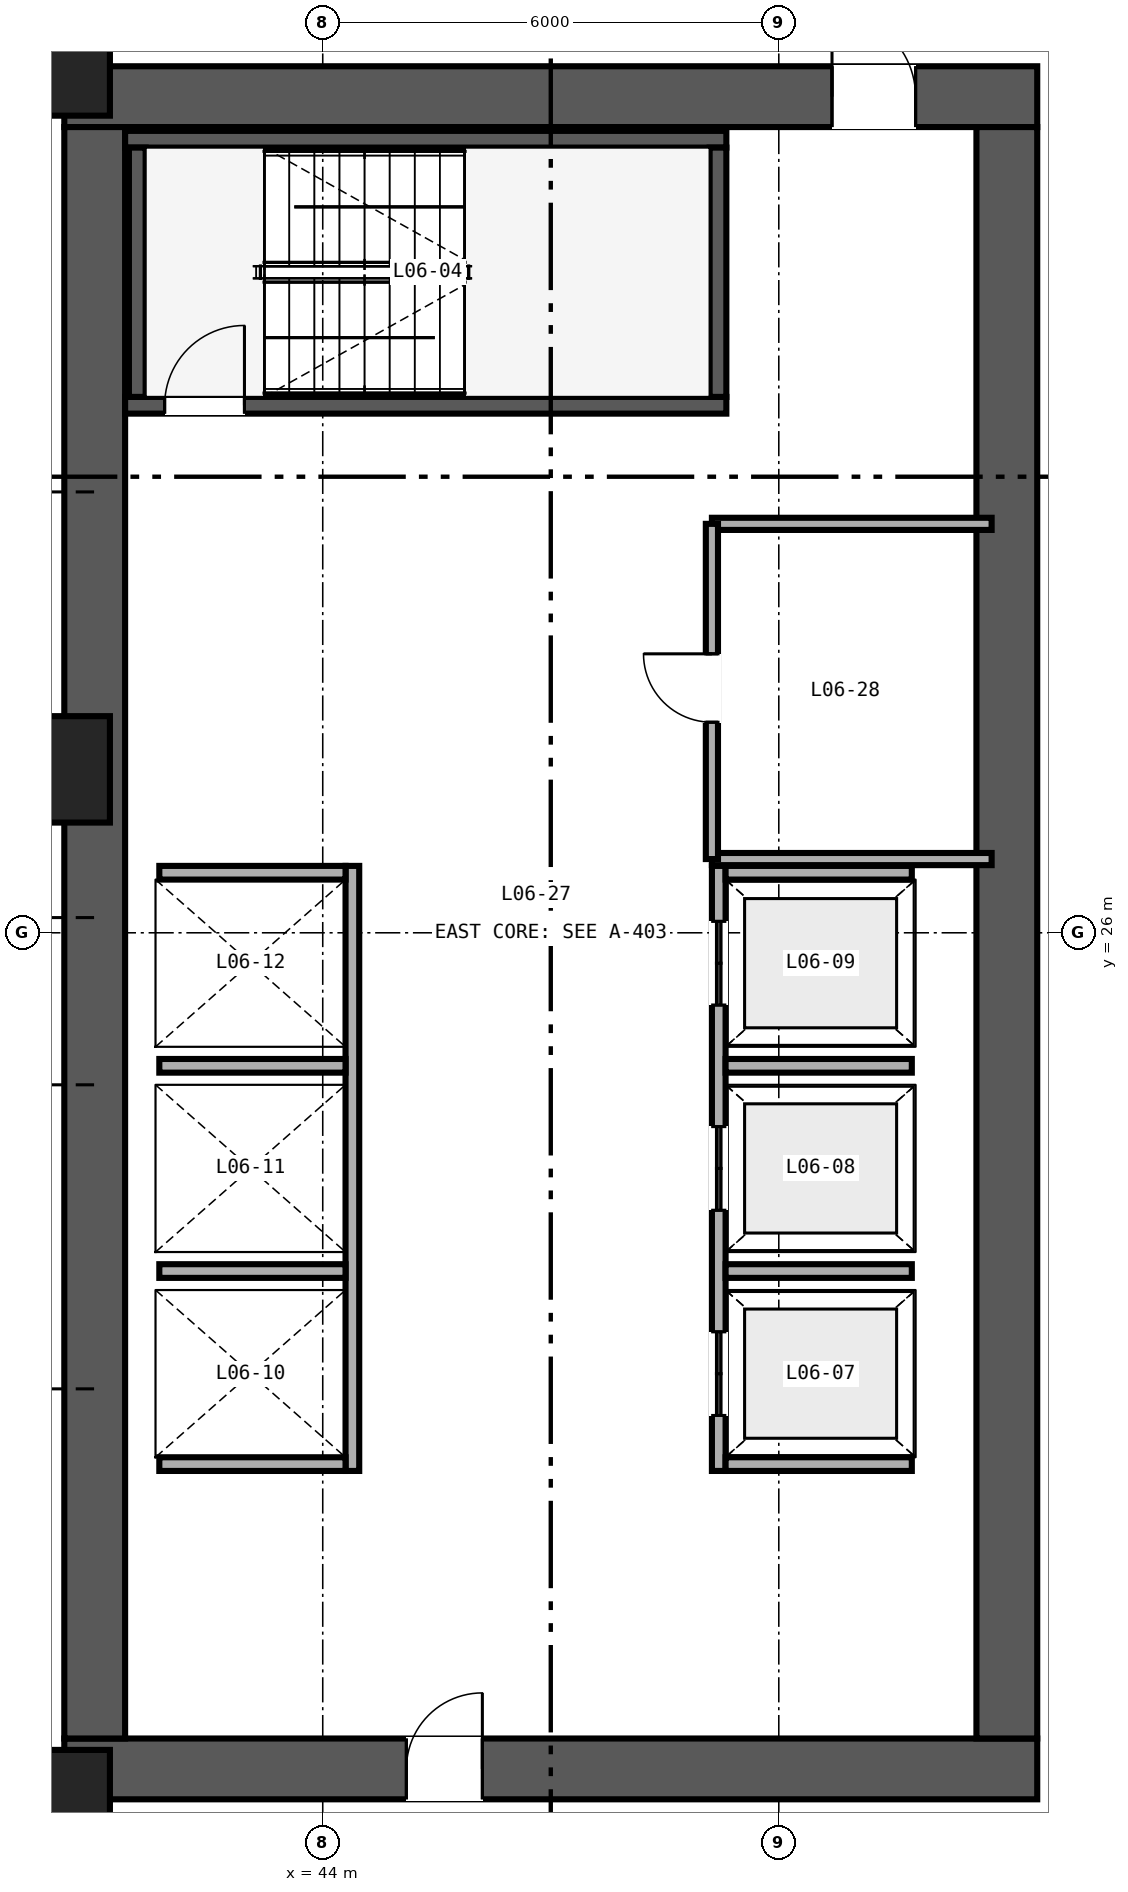
"""IFC4 building model, lengths in metres.
Left out: names, types, materials, properties, quantities, classifications, styles, units other than length and angle.
Written with IfcOpenShell. Run it as: python <this file> out.ifc"""

import sys

from ifc_helpers import new_model, si_unit, direction, frame, frame_2d, origin, origin_2d, place, context, subcontext, project, spatial, rectangle, extrude, source, transform, mapped, element, fill, save


model = new_model("IFC4")
c1 = context("Model", 3, precision=1e-05, world=origin(), true_north=direction((0.0, 1.0)))
c2 = subcontext(c1, "Body", "Model", "MODEL_VIEW")
j1 = project(units=[si_unit("LENGTHUNIT", "METRE"), si_unit("PLANEANGLEUNIT", "RADIAN")], contexts=[c1])
p1 = place(None, origin())
s1 = spatial("IfcSite", under=j1, at=p1, CompositionType="ELEMENT")
p2 = place(p1, origin())
s2 = spatial("IfcBuilding", under=s1, at=p2, CompositionType="ELEMENT")
p3 = place(p2, frame((0.0, 0.0, 28.8)))
s3 = spatial("IfcBuildingStorey", under=s2, at=p3, CompositionType="ELEMENT", Elevation=28.8)
p4 = place(p3, frame((40.6, 15.0, 0.0), z_axis=(0.0, 0.0, 1.0), x_axis=(1.0, 0.0, 0.0)))
e1 = element("IfcWall", 1, at=p4, inside=s3, PredefinedType="SHEAR", context=c2, shape_type="SweptSolid", body=[
    extrude(rectangle(XDim=12.8, YDim=0.8, at=frame_2d((6.4, 0.0))), origin(), (0.0, 0.0, 1.0), 5.75),
])
p5 = place(p4, frame((4.5, 0.0, 0.0)))
e2 = element("IfcOpeningElement", 2, at=p5, cuts=e1, PredefinedType="OPENING", context=c2, shape_type="SweptSolid", body=[
    extrude(rectangle(XDim=1.0, YDim=2.15, at=frame_2d((0.5, 1.075))), frame((0.0, 0.41, 0.0), z_axis=(0.0, -1.0, 0.0), x_axis=(1.0, 0.0, 0.0)), (0.0, 0.0, 1.0), 0.82),
])
p6 = place(p3, frame((40.6, 37.0, 0.0), z_axis=(0.0, 0.0, 1.0), x_axis=(1.0, 0.0, 0.0)))
e3 = element("IfcWall", 3, at=p6, inside=s3, PredefinedType="SHEAR", context=c2, shape_type="SweptSolid", body=[
    extrude(rectangle(XDim=12.8, YDim=0.8, at=frame_2d((6.4, 0.0))), origin(), (0.0, 0.0, 1.0), 5.75),
])
p7 = place(p6, frame((10.1, 0.0, 0.0)))
e4 = element("IfcOpeningElement", 4, at=p7, cuts=e3, PredefinedType="OPENING", context=c2, shape_type="SweptSolid", body=[
    extrude(rectangle(XDim=1.1, YDim=2.15, at=frame_2d((0.55, 1.075))), frame((0.0, 0.41, 0.0), z_axis=(0.0, -1.0, 0.0), x_axis=(1.0, 0.0, 0.0)), (0.0, 0.0, 1.0), 0.82),
])
for number, where, z_axis, x_axis in (
    (5, (41.0, 15.4, 0.0), (0.0, 0.0, 1.0), (0.0, 1.0, 0.0)),
    (6, (53.0, 15.4, 0.0), (0.0, 0.0, 1.0), (0.0, 1.0, 0.0)),
):
    element("IfcWall", number, at=place(p3, frame(where, z_axis=z_axis, x_axis=x_axis)), inside=s3, PredefinedType="SHEAR", context=c2, shape_type="SweptSolid", body=[
        extrude(rectangle(XDim=21.2, YDim=0.8, at=frame_2d((10.6, 0.0))), origin(), (0.0, 0.0, 1.0), 5.75),
    ])
p8 = place(p3, frame((41.4, 32.94, 0.0), z_axis=(0.0, 0.0, 1.0), x_axis=(1.0, 0.0, 0.0)))
e7 = element("IfcWall", 7, at=p8, inside=s3, PredefinedType="SHEAR", context=c2, shape_type="SweptSolid", body=[
    extrude(rectangle(XDim=7.91, YDim=0.22, at=frame_2d((3.955, 0.0))), origin(), (0.0, 0.0, 1.0), 5.8),
])
p9 = place(p8, frame((0.52, 0.0, 0.0)))
e8 = element("IfcOpeningElement", 8, at=p9, cuts=e7, PredefinedType="OPENING", context=c2, shape_type="SweptSolid", body=[
    extrude(rectangle(XDim=1.05, YDim=2.15, at=frame_2d((0.525, 1.075))), frame((0.0, 0.12, 0.0), z_axis=(0.0, -1.0, 0.0), x_axis=(1.0, 0.0, 0.0)), (0.0, 0.0, 1.0), 0.24),
])
p10 = place(p3, frame((41.4, 36.44, 0.0), z_axis=(0.0, 0.0, 1.0), x_axis=(1.0, 0.0, 0.0)))
e9 = element("IfcWall", 9, at=p10, inside=s3, PredefinedType="SHEAR", context=c2, shape_type="SweptSolid", body=[
    extrude(rectangle(XDim=7.91, YDim=0.22, at=frame_2d((3.955, 0.0))), origin(), (0.0, 0.0, 1.0), 5.8),
])
for number, where, z_axis, x_axis in (
    (10, (41.56, 33.05, 0.0), (0.0, 0.0, 1.0), (0.0, 1.0, 0.0)),
    (11, (49.2, 33.05, 0.0), (0.0, 0.0, 1.0), (0.0, 1.0, 0.0)),
):
    element("IfcWall", number, at=place(p3, frame(where, z_axis=z_axis, x_axis=x_axis)), inside=s3, PredefinedType="SHEAR", context=c2, shape_type="SweptSolid", body=[
        extrude(rectangle(XDim=3.28, YDim=0.22, at=frame_2d((1.64, 0.0))), origin(), (0.0, 0.0, 1.0), 5.8),
    ])
m1 = source(origin(), c2, "Body", "SweptSolid", [
    extrude(rectangle(XDim=1.4, YDim=1.4, at=origin_2d()), origin(), (0.0, 0.0, 1.0), 5.75),
])
for number, where, z_axis, x_axis in (
    (12, (40.5, 14.55, 0.0), (0.0, 0.0, 1.0), (1.0, 0.0, 0.0)),
    (13, (40.5, 28.15, 0.0), (0.0, 0.0, 1.0), (1.0, 0.0, 0.0)),
    (14, (40.5, 37.45, 0.0), (0.0, 0.0, 1.0), (1.0, 0.0, 0.0)),
):
    element("IfcColumn", number, at=place(p3, frame(where, z_axis=z_axis, x_axis=x_axis)), inside=s3, PredefinedType="COLUMN", context=c2, shape_type="MappedRepresentation", body=[
        mapped(m1, transform((0.0, 0.0, 0.0), scale=1.0)),
    ])
p11 = place(p3, frame((49.21, 18.92, 0.0), z_axis=(0.0, 0.0, 1.0), x_axis=(0.0, 1.0, 0.0)))
e15 = element("IfcWall", 15, at=p11, inside=s3, PredefinedType="SOLIDWALL", context=c2, shape_type="SweptSolid", body=[
    extrude(rectangle(XDim=7.96, YDim=0.18, at=frame_2d((3.98, 0.0))), origin(), (0.0, 0.0, 1.0), 5.75),
])
p12 = place(p11, frame((0.73, 0.0, 0.0)))
e16 = element("IfcOpeningElement", 16, at=p12, cuts=e15, PredefinedType="OPENING", context=c2, shape_type="SweptSolid", body=[
    extrude(rectangle(XDim=1.1, YDim=2.2, at=frame_2d((0.55, 1.1))), frame((0.0, 0.1, 0.0), z_axis=(0.0, -1.0, 0.0), x_axis=(1.0, 0.0, 0.0)), (0.0, 0.0, 1.0), 0.2),
])
p13 = place(p11, frame((3.43, 0.0, 0.0)))
e17 = element("IfcOpeningElement", 17, at=p13, cuts=e15, PredefinedType="OPENING", context=c2, shape_type="SweptSolid", body=[
    extrude(rectangle(XDim=1.1, YDim=2.2, at=frame_2d((0.55, 1.1))), frame((0.0, 0.1, 0.0), z_axis=(0.0, -1.0, 0.0), x_axis=(1.0, 0.0, 0.0)), (0.0, 0.0, 1.0), 0.2),
])
p14 = place(p11, frame((6.13, 0.0, 0.0)))
e18 = element("IfcOpeningElement", 18, at=p14, cuts=e15, PredefinedType="OPENING", context=c2, shape_type="SweptSolid", body=[
    extrude(rectangle(XDim=1.1, YDim=2.2, at=frame_2d((0.55, 1.1))), frame((0.0, 0.1, 0.0), z_axis=(0.0, -1.0, 0.0), x_axis=(1.0, 0.0, 0.0)), (0.0, 0.0, 1.0), 0.2),
])
for number, where, z_axis, x_axis in (
    (19, (49.3, 19.01, 0.0), (0.0, 0.0, 1.0), (1.0, 0.0, 0.0)),
    (20, (49.3, 26.79, 0.0), (0.0, 0.0, 1.0), (1.0, 0.0, 0.0)),
    (21, (49.3, 21.55, 0.0), (0.0, 0.0, 1.0), (1.0, 0.0, 0.0)),
    (22, (49.3, 24.25, 0.0), (0.0, 0.0, 1.0), (1.0, 0.0, 0.0)),
):
    element("IfcWall", number, at=place(p3, frame(where, z_axis=z_axis, x_axis=x_axis)), inside=s3, PredefinedType="SOLIDWALL", context=c2, shape_type="SweptSolid", body=[
        extrude(rectangle(XDim=2.45, YDim=0.18, at=frame_2d((1.225, 0.0))), origin(), (0.0, 0.0, 1.0), 5.75),
    ])
p15 = place(p3, frame((44.39, 18.92, 0.0), z_axis=(0.0, 0.0, 1.0), x_axis=(0.0, 1.0, 0.0)))
e23 = element("IfcWall", 23, at=p15, inside=s3, PredefinedType="SOLIDWALL", context=c2, shape_type="SweptSolid", body=[
    extrude(rectangle(XDim=7.96, YDim=0.18, at=frame_2d((3.98, 0.0))), origin(), (0.0, 0.0, 1.0), 5.75),
])
for number, where, z_axis, x_axis in (
    (24, (41.85, 19.01, 0.0), (0.0, 0.0, 1.0), (1.0, 0.0, 0.0)),
    (25, (41.85, 26.79, 0.0), (0.0, 0.0, 1.0), (1.0, 0.0, 0.0)),
    (26, (41.85, 21.55, 0.0), (0.0, 0.0, 1.0), (1.0, 0.0, 0.0)),
    (27, (41.85, 24.25, 0.0), (0.0, 0.0, 1.0), (1.0, 0.0, 0.0)),
):
    element("IfcWall", number, at=place(p3, frame(where, z_axis=z_axis, x_axis=x_axis)), inside=s3, PredefinedType="SOLIDWALL", context=c2, shape_type="SweptSolid", body=[
        extrude(rectangle(XDim=2.45, YDim=0.18, at=frame_2d((1.225, 0.0))), origin(), (0.0, 0.0, 1.0), 5.75),
    ])
p16 = place(p3, frame((49.12, 26.97, 0.0), z_axis=(0.0, 0.0, 1.0), x_axis=(1.0, 0.0, 0.0)))
e28 = element("IfcWall", 28, at=p16, inside=s3, PredefinedType="PARTITIONING", context=c2, shape_type="SweptSolid", body=[
    extrude(rectangle(XDim=3.68, YDim=0.16, at=frame_2d((1.84, 0.0))), origin(), (0.0, 0.0, 1.0), 5.75),
])
p17 = place(p3, frame((49.12, 31.38, 0.0), z_axis=(0.0, 0.0, 1.0), x_axis=(1.0, 0.0, 0.0)))
e29 = element("IfcWall", 29, at=p17, inside=s3, PredefinedType="PARTITIONING", context=c2, shape_type="SweptSolid", body=[
    extrude(rectangle(XDim=3.68, YDim=0.16, at=frame_2d((1.84, 0.0))), origin(), (0.0, 0.0, 1.0), 4.65),
])
p18 = place(p3, frame((49.12, 26.97, 0.0), z_axis=(0.0, 0.0, 1.0), x_axis=(0.0, 1.0, 0.0)))
e30 = element("IfcWall", 30, at=p18, inside=s3, PredefinedType="PARTITIONING", context=c2, shape_type="SweptSolid", body=[
    extrude(rectangle(XDim=4.41, YDim=0.16, at=frame_2d((2.205, 0.0))), origin(), (0.0, 0.0, 1.0), 4.65),
])
p19 = place(p18, frame((1.8, 0.0, 0.0)))
e31 = element("IfcOpeningElement", 31, at=p19, cuts=e30, PredefinedType="OPENING", context=c2, shape_type="SweptSolid", body=[
    extrude(rectangle(XDim=0.9, YDim=2.15, at=frame_2d((0.45, 1.075))), frame((0.0, 0.09, 0.0), z_axis=(0.0, -1.0, 0.0), x_axis=(1.0, 0.0, 0.0)), (0.0, 0.0, 1.0), 0.18),
])
m2 = source(origin(), c2, "Body", "SweptSolid", [
    extrude(rectangle(XDim=1.05, YDim=2.15, at=frame_2d((0.525, 1.075))), frame((0.0, 0.025, 0.0), z_axis=(0.0, -1.0, 0.0), x_axis=(1.0, 0.0, 0.0)), (0.0, 0.0, 1.0), 0.05),
])
p20 = place(p9, origin())
e32 = element("IfcDoor", 32, at=p20, inside=s3, OperationType="SINGLE_SWING_RIGHT", PredefinedType="DOOR", context=c2, shape_type="MappedRepresentation", body=[
    mapped(m2, transform((0.0, 0.0, 0.0), scale=1.0)),
])
fill(e8, e32)
m3 = source(origin(), c2, "Body", "SweptSolid", [
    extrude(rectangle(XDim=1.1, YDim=2.2, at=frame_2d((0.55, 1.1))), frame((0.0, 0.025, 0.0), z_axis=(0.0, -1.0, 0.0), x_axis=(1.0, 0.0, 0.0)), (0.0, 0.0, 1.0), 0.05),
])
p21 = place(p12, origin())
e33 = element("IfcDoor", 33, at=p21, inside=s3, OperationType="DOUBLE_DOOR_SLIDING", PredefinedType="DOOR", context=c2, shape_type="MappedRepresentation", body=[
    mapped(m3, transform((0.0, 0.0, 0.0), scale=1.0)),
])
fill(e16, e33)
p22 = place(p13, origin())
e34 = element("IfcDoor", 34, at=p22, inside=s3, OperationType="DOUBLE_DOOR_SLIDING", PredefinedType="DOOR", context=c2, shape_type="MappedRepresentation", body=[
    mapped(m3, transform((0.0, 0.0, 0.0), scale=1.0)),
])
fill(e17, e34)
p23 = place(p14, origin())
e35 = element("IfcDoor", 35, at=p23, inside=s3, OperationType="DOUBLE_DOOR_SLIDING", PredefinedType="DOOR", context=c2, shape_type="MappedRepresentation", body=[
    mapped(m3, transform((0.0, 0.0, 0.0), scale=1.0)),
])
fill(e18, e35)
m4 = source(origin(), c2, "Body", "SweptSolid", [
    extrude(rectangle(XDim=1.0, YDim=2.15, at=frame_2d((0.5, 1.075))), frame((0.0, 0.025, 0.0), z_axis=(0.0, -1.0, 0.0), x_axis=(1.0, 0.0, 0.0)), (0.0, 0.0, 1.0), 0.05),
])
p24 = place(p5, origin())
e36 = element("IfcDoor", 36, at=p24, inside=s3, OperationType="SINGLE_SWING_RIGHT", PredefinedType="DOOR", context=c2, shape_type="MappedRepresentation", body=[
    mapped(m4, transform((0.0, 0.0, 0.0), scale=1.0)),
])
fill(e2, e36)
m5 = source(origin(), c2, "Body", "SweptSolid", [
    extrude(rectangle(XDim=1.1, YDim=2.15, at=frame_2d((0.55, 1.075))), frame((0.0, 0.025, 0.0), z_axis=(0.0, -1.0, 0.0), x_axis=(1.0, 0.0, 0.0)), (0.0, 0.0, 1.0), 0.05),
])
p25 = place(p7, origin())
e37 = element("IfcDoor", 37, at=p25, inside=s3, OperationType="SINGLE_SWING_LEFT", PredefinedType="DOOR", context=c2, shape_type="MappedRepresentation", body=[
    mapped(m5, transform((0.0, 0.0, 0.0), scale=1.0)),
])
fill(e4, e37)
m6 = source(origin(), c2, "Body", "SweptSolid", [
    extrude(rectangle(XDim=0.9, YDim=2.15, at=frame_2d((0.45, 1.075))), frame((0.0, 0.025, 0.0), z_axis=(0.0, -1.0, 0.0), x_axis=(1.0, 0.0, 0.0)), (0.0, 0.0, 1.0), 0.05),
])
p26 = place(p19, origin())
e38 = element("IfcDoor", 38, at=p26, inside=s3, OperationType="SINGLE_SWING_RIGHT", PredefinedType="DOOR", context=c2, shape_type="MappedRepresentation", body=[
    mapped(m6, transform((0.0, 0.0, 0.0), scale=1.0)),
])
fill(e31, e38)
save(model, sys.argv[1])
